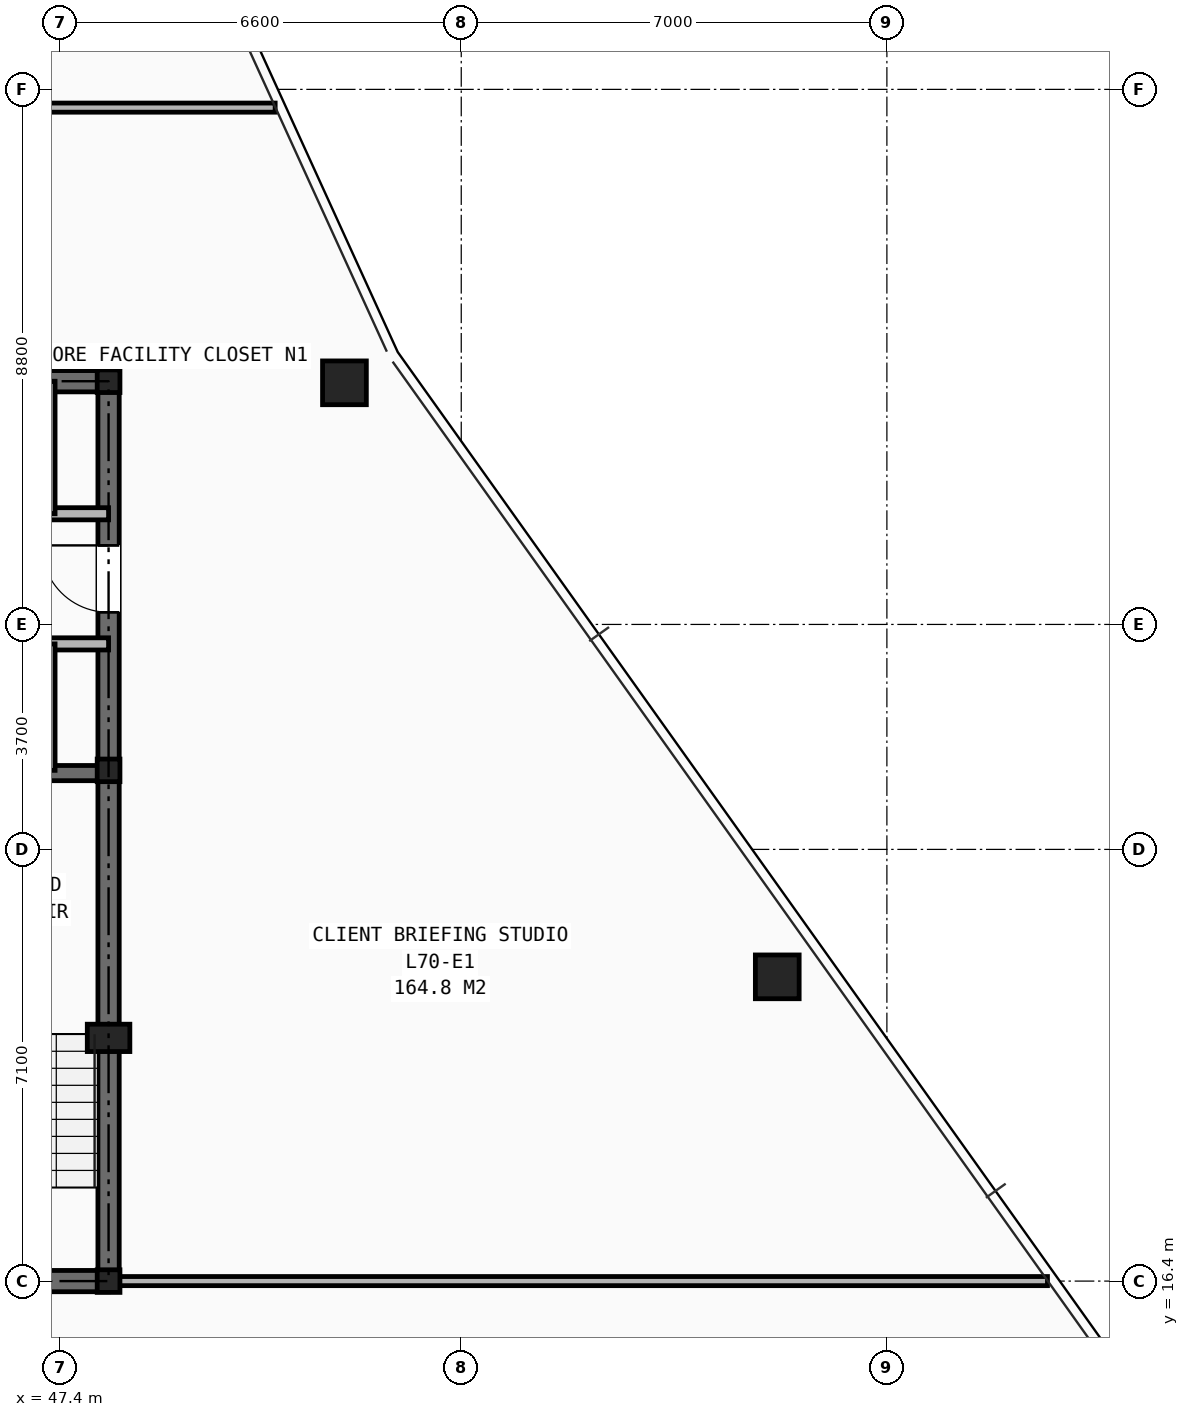
"""IFC4 building model, lengths in metres.
Left out: names, types, materials, properties, quantities, classifications, styles, units other than length and angle.
Written with IfcOpenShell. Run it as: python <this file> out.ifc"""

import sys

from ifc_helpers import new_model, si_unit, direction, frame, frame_2d, origin, origin_2d, place, context, subcontext, project, spatial, rectangle, hollow_rectangle, i_section, extrude, element, fill, save


model = new_model("IFC4")
c1 = context("Model", 3, precision=1e-05, world=origin(), true_north=direction((0.0, 1.0)))
c2 = subcontext(c1, "Body", "Model", "MODEL_VIEW")
j1 = project(units=[si_unit("LENGTHUNIT", "METRE"), si_unit("PLANEANGLEUNIT", "RADIAN")], contexts=[c1])
p1 = place(None, origin())
s1 = spatial("IfcSite", under=j1, at=p1, CompositionType="ELEMENT")
p2 = place(p1, origin())
s2 = spatial("IfcBuilding", under=s1, at=p2, CompositionType="ELEMENT")
p3 = place(p2, frame((0.0, 0.0, 246.9)))
s3 = spatial("IfcBuildingStorey", under=s2, at=p3, CompositionType="ELEMENT", Elevation=246.9)
for number, where, z_axis, x_axis in (
    (1, (48.2, 16.4, 0.0), (0.0, 0.0, 1.0), (1.0, 0.0, 0.0)),
    (2, (48.2, 24.8, 0.0), (0.0, 0.0, 1.0), (1.0, 0.0, 0.0)),
    (3, (48.2, 31.2, 0.0), (0.0, 0.0, 1.0), (1.0, 0.0, 0.0)),
):
    element("IfcColumn", number, at=place(p3, frame(where, z_axis=z_axis, x_axis=x_axis)), inside=s3, PredefinedType="COLUMN", context=c2, shape_type="SweptSolid", body=[
        extrude(i_section(OverallWidth=0.374, OverallDepth=0.372, WebThickness=0.016, FlangeThickness=0.026, at=origin_2d()), origin(), (0.0, 0.0, 1.0), 3.5),
    ])
p4 = place(p3, frame((48.2, 20.4, 0.0), z_axis=(0.0, 0.0, 1.0), x_axis=(1.0, 0.0, 0.0)))
e4 = element("IfcColumn", 4, at=p4, inside=s3, PredefinedType="PILASTER", context=c2, shape_type="SweptSolid", body=[
    extrude(rectangle(XDim=0.7, YDim=0.45, at=origin_2d()), origin(), (0.0, 0.0, 1.0), 3.5),
])
for number, where, z_axis, x_axis in (
    (5, (59.197, 21.404, 0.0), (0.0, 0.0, 1.0), (1.0, 0.0, 0.0)),
    (6, (52.079, 31.174, 0.0), (0.0, 0.0, 1.0), (1.0, 0.0, 0.0)),
):
    element("IfcColumn", number, at=place(p3, frame(where, z_axis=z_axis, x_axis=x_axis)), inside=s3, PredefinedType="COLUMN", context=c2, shape_type="SweptSolid", body=[
        extrude(hollow_rectangle(XDim=0.72, YDim=0.72, WallThickness=0.05, at=origin_2d()), origin(), (0.0, 0.0, 1.0), 3.5),
    ])
p5 = place(p3, frame((31.8, 16.4, 0.0), z_axis=(0.0, 0.0, 1.0), x_axis=(1.0, 0.0, 0.0)))
e7 = element("IfcWall", 7, at=p5, inside=s3, PredefinedType="SHEAR", context=c2, shape_type="SweptSolid", body=[
    extrude(rectangle(XDim=16.4, YDim=0.35, at=frame_2d((8.2, 0.0))), origin(), (0.0, 0.0, 1.0), 3.2),
])
p6 = place(p5, frame((7.75, 0.0, 0.0)))
e8 = element("IfcOpeningElement", 8, at=p6, cuts=e7, PredefinedType="OPENING", context=c2, shape_type="SweptSolid", body=[
    extrude(rectangle(XDim=0.9, YDim=2.1, at=frame_2d((0.45, 1.05))), frame((0.0, 0.185, 0.0), z_axis=(0.0, -1.0, 0.0), x_axis=(1.0, 0.0, 0.0)), (0.0, 0.0, 1.0), 0.37),
])
p7 = place(p5, frame((4.2, 0.0, 0.0)))
e9 = element("IfcOpeningElement", 9, at=p7, cuts=e7, PredefinedType="OPENING", context=c2, shape_type="SweptSolid", body=[
    extrude(rectangle(XDim=0.95, YDim=2.1, at=frame_2d((0.475, 1.05))), frame((0.0, 0.185, 0.0), z_axis=(0.0, -1.0, 0.0), x_axis=(1.0, 0.0, 0.0)), (0.0, 0.0, 1.0), 0.37),
])
p8 = place(p5, frame((10.6, 0.0, 0.0)))
e10 = element("IfcOpeningElement", 10, at=p8, cuts=e7, PredefinedType="OPENING", context=c2, shape_type="SweptSolid", body=[
    extrude(rectangle(XDim=0.95, YDim=2.1, at=frame_2d((0.475, 1.05))), frame((0.0, 0.185, 0.0), z_axis=(0.0, -1.0, 0.0), x_axis=(1.0, 0.0, 0.0)), (0.0, 0.0, 1.0), 0.37),
])
p9 = place(p3, frame((31.8, 31.2, 0.0), z_axis=(0.0, 0.0, 1.0), x_axis=(1.0, 0.0, 0.0)))
e11 = element("IfcWall", 11, at=p9, inside=s3, PredefinedType="SHEAR", context=c2, shape_type="SweptSolid", body=[
    extrude(rectangle(XDim=16.4, YDim=0.35, at=frame_2d((8.2, 0.0))), origin(), (0.0, 0.0, 1.0), 3.2),
])
p10 = place(p3, frame((48.2, 16.4, 0.0), z_axis=(0.0, 0.0, 1.0), x_axis=(0.0, 1.0, 0.0)))
e12 = element("IfcWall", 12, at=p10, inside=s3, PredefinedType="SHEAR", context=c2, shape_type="SweptSolid", body=[
    extrude(rectangle(XDim=14.8, YDim=0.35, at=frame_2d((7.4, 0.0))), origin(), (0.0, 0.0, 1.0), 3.2),
])
p11 = place(p10, frame((11.0, 0.0, 0.0)))
e13 = element("IfcOpeningElement", 13, at=p11, cuts=e12, PredefinedType="OPENING", context=c2, shape_type="SweptSolid", body=[
    extrude(rectangle(XDim=1.1, YDim=2.15, at=frame_2d((0.55, 1.075))), frame((0.0, 0.185, 0.0), z_axis=(0.0, -1.0, 0.0), x_axis=(1.0, 0.0, 0.0)), (0.0, 0.0, 1.0), 0.37),
])
p12 = place(p3, frame((44.955, 24.755, 0.0), z_axis=(0.0, 0.0, 1.0), x_axis=(1.0, 0.0, 0.0)))
e14 = element("IfcWall", 14, at=p12, inside=s3, PredefinedType="SHEAR", context=c2, shape_type="SweptSolid", body=[
    extrude(rectangle(XDim=3.245, YDim=0.25, at=frame_2d((1.623, 0.0))), origin(), (0.0, 0.0, 1.0), 3.2),
])
p13 = place(p3, frame((33.82, 29.02, 0.0), z_axis=(0.0, 0.0, 1.0), x_axis=(1.0, 0.0, 0.0)))
e15 = element("IfcWall", 15, at=p13, inside=s3, PredefinedType="SOLIDWALL", context=c2, shape_type="SweptSolid", body=[
    extrude(rectangle(XDim=14.38, YDim=0.2, at=frame_2d((7.19, 0.0))), origin(), (0.0, 0.0, 1.0), 2.655),
])
p14 = place(p13, frame((1.78, 0.0, 0.0)))
e16 = element("IfcOpeningElement", 16, at=p14, cuts=e15, PredefinedType="OPENING", context=c2, shape_type="SweptSolid", body=[
    extrude(rectangle(XDim=0.9, YDim=2.1, at=frame_2d((0.45, 1.05))), frame((0.0, 0.11, 0.0), z_axis=(0.0, -1.0, 0.0), x_axis=(1.0, 0.0, 0.0)), (0.0, 0.0, 1.0), 0.22),
])
p15 = place(p13, frame((6.07, 0.0, 0.0)))
e17 = element("IfcOpeningElement", 17, at=p15, cuts=e15, PredefinedType="OPENING", context=c2, shape_type="SweptSolid", body=[
    extrude(rectangle(XDim=0.9, YDim=2.1, at=frame_2d((0.45, 1.05))), frame((0.0, 0.11, 0.0), z_axis=(0.0, -1.0, 0.0), x_axis=(1.0, 0.0, 0.0)), (0.0, 0.0, 1.0), 0.22),
])
p16 = place(p13, frame((9.39, 0.0, 0.0)))
e18 = element("IfcOpeningElement", 18, at=p16, cuts=e15, PredefinedType="OPENING", context=c2, shape_type="SweptSolid", body=[
    extrude(rectangle(XDim=1.1, YDim=2.15, at=frame_2d((0.55, 1.075))), frame((0.0, 0.11, 0.0), z_axis=(0.0, -1.0, 0.0), x_axis=(1.0, 0.0, 0.0)), (0.0, 0.0, 1.0), 0.22),
])
p17 = place(p13, frame((11.71, 0.0, 0.0)))
e19 = element("IfcOpeningElement", 19, at=p17, cuts=e15, PredefinedType="OPENING", context=c2, shape_type="SweptSolid", body=[
    extrude(rectangle(XDim=1.1, YDim=2.15, at=frame_2d((0.55, 1.075))), frame((0.0, 0.11, 0.0), z_axis=(0.0, -1.0, 0.0), x_axis=(1.0, 0.0, 0.0)), (0.0, 0.0, 1.0), 0.22),
])
p18 = place(p3, frame((31.8, 26.88, 0.0), z_axis=(0.0, 0.0, 1.0), x_axis=(1.0, 0.0, 0.0)))
e20 = element("IfcWall", 20, at=p18, inside=s3, PredefinedType="SOLIDWALL", context=c2, shape_type="SweptSolid", body=[
    extrude(rectangle(XDim=16.4, YDim=0.2, at=frame_2d((8.2, 0.0))), origin(), (0.0, 0.0, 1.0), 2.655),
])
p19 = place(p18, frame((0.55, 0.0, 0.0)))
e21 = element("IfcOpeningElement", 21, at=p19, cuts=e20, PredefinedType="OPENING", context=c2, shape_type="SweptSolid", body=[
    extrude(rectangle(XDim=0.85, YDim=2.05, at=frame_2d((0.425, 1.025))), frame((0.0, 0.11, 0.0), z_axis=(0.0, -1.0, 0.0), x_axis=(1.0, 0.0, 0.0)), (0.0, 0.0, 1.0), 0.22),
])
p20 = place(p18, frame((5.94, 0.0, 0.0)))
e22 = element("IfcOpeningElement", 22, at=p20, cuts=e20, PredefinedType="OPENING", context=c2, shape_type="SweptSolid", body=[
    extrude(rectangle(XDim=0.9, YDim=2.1, at=frame_2d((0.45, 1.05))), frame((0.0, 0.11, 0.0), z_axis=(0.0, -1.0, 0.0), x_axis=(1.0, 0.0, 0.0)), (0.0, 0.0, 1.0), 0.22),
])
p21 = place(p18, frame((11.41, 0.0, 0.0)))
e23 = element("IfcOpeningElement", 23, at=p21, cuts=e20, PredefinedType="OPENING", context=c2, shape_type="SweptSolid", body=[
    extrude(rectangle(XDim=1.1, YDim=2.15, at=frame_2d((0.55, 1.075))), frame((0.0, 0.11, 0.0), z_axis=(0.0, -1.0, 0.0), x_axis=(1.0, 0.0, 0.0)), (0.0, 0.0, 1.0), 0.22),
])
p22 = place(p18, frame((13.73, 0.0, 0.0)))
e24 = element("IfcOpeningElement", 24, at=p22, cuts=e20, PredefinedType="OPENING", context=c2, shape_type="SweptSolid", body=[
    extrude(rectangle(XDim=1.1, YDim=2.15, at=frame_2d((0.55, 1.075))), frame((0.0, 0.11, 0.0), z_axis=(0.0, -1.0, 0.0), x_axis=(1.0, 0.0, 0.0)), (0.0, 0.0, 1.0), 0.22),
])
p23 = place(p3, frame((47.24, 29.02, 0.0), z_axis=(0.0, 0.0, 1.0), x_axis=(0.0, 1.0, 0.0)))
e25 = element("IfcWall", 25, at=p23, inside=s3, PredefinedType="SOLIDWALL", context=c2, shape_type="SweptSolid", body=[
    extrude(rectangle(XDim=2.18, YDim=0.16, at=frame_2d((1.09, 0.0))), origin(), (0.0, 0.0, 1.0), 2.928),
])
p24 = place(p3, frame((47.24, 24.8, 0.0), z_axis=(0.0, 0.0, 1.0), x_axis=(0.0, 1.0, 0.0)))
e26 = element("IfcWall", 26, at=p24, inside=s3, PredefinedType="SOLIDWALL", context=c2, shape_type="SweptSolid", body=[
    extrude(rectangle(XDim=2.08, YDim=0.16, at=frame_2d((1.04, 0.0))), origin(), (0.0, 0.0, 1.0), 3.2),
])
p25 = place(p3, frame((48.2, 16.4, 0.0), z_axis=(0.0, 0.0, 1.0), x_axis=(1.0, 0.0, 0.0)))
e27 = element("IfcWall", 27, at=p25, inside=s3, PredefinedType="PARTITIONING", context=c2, shape_type="SweptSolid", body=[
    extrude(rectangle(XDim=15.441, YDim=0.15, at=frame_2d((7.72, 0.0))), origin(), (0.0, 0.0, 1.0), 2.215),
])
p26 = place(p3, frame((46.8, 35.7, 0.0), z_axis=(0.0, 0.0, 1.0), x_axis=(1.0, 0.0, 0.0)))
e28 = element("IfcWall", 28, at=p26, inside=s3, PredefinedType="PARTITIONING", context=c2, shape_type="SweptSolid", body=[
    extrude(rectangle(XDim=4.14, YDim=0.15, at=frame_2d((2.07, 0.0))), origin(), (0.0, 0.0, 1.0), 2.578),
])
p27 = place(p11, origin())
e29 = element("IfcDoor", 29, at=p27, inside=s3, OperationType="SINGLE_SWING_RIGHT", PredefinedType="DOOR", context=c2, shape_type="SweptSolid", body=[
    extrude(rectangle(XDim=1.1, YDim=2.15, at=frame_2d((0.55, 1.075))), frame((0.0, 0.025, 0.0), z_axis=(0.0, -1.0, 0.0), x_axis=(1.0, 0.0, 0.0)), (0.0, 0.0, 1.0), 0.05),
])
fill(e13, e29)
save(model, sys.argv[1])
